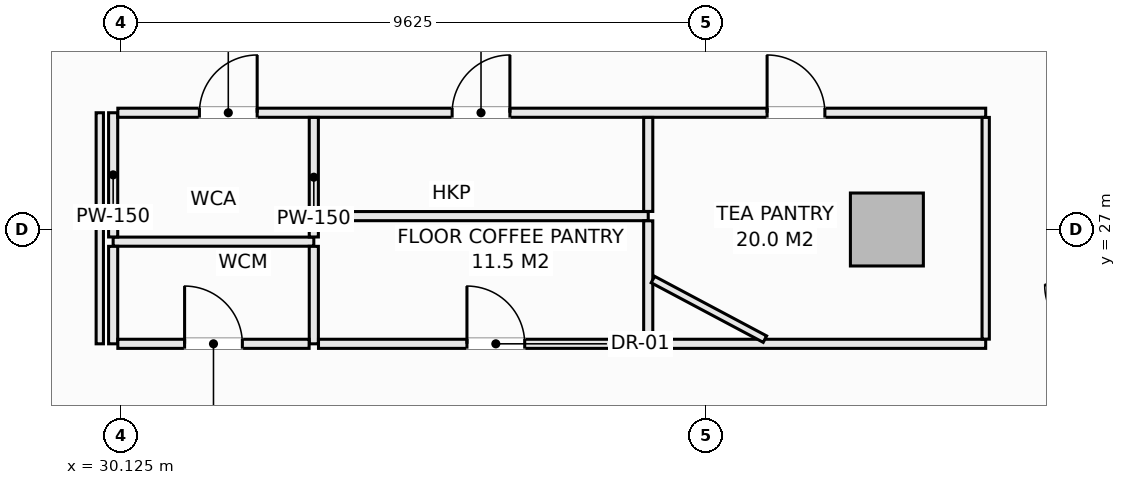
"""IFC4 building model, lengths in metres.
Left out: names, types, materials, properties, quantities, classifications, styles, units other than length and angle.
Written with IfcOpenShell. Run it as: python <this file> out.ifc"""

import sys

from ifc_helpers import new_model, si_unit, direction, frame, frame_2d, origin, origin_2d, place, context, subcontext, project, spatial, rectangle, extrude, element, fill, save


model = new_model("IFC4")
c1 = context("Model", 3, precision=1e-05, world=origin(), true_north=direction((0.0, 1.0)))
c2 = subcontext(c1, "Body", "Model", "MODEL_VIEW")
j1 = project(units=[si_unit("LENGTHUNIT", "METRE"), si_unit("PLANEANGLEUNIT", "RADIAN")], contexts=[c1])
p1 = place(None, origin())
s1 = spatial("IfcSite", under=j1, at=p1, CompositionType="ELEMENT")
p2 = place(p1, origin())
s2 = spatial("IfcBuilding", under=s1, at=p2, CompositionType="ELEMENT")
p3 = place(p2, frame((0.0, 0.0, 65.0)))
s3 = spatial("IfcBuildingStorey", under=s2, at=p3, CompositionType="ELEMENT", Elevation=65.0)
p4 = place(p3, frame((42.725, 27.0, -0.28), z_axis=(0.0, 0.0, 1.0), x_axis=(1.0, 0.0, 0.0)))
e1 = element("IfcColumn", 1, at=p4, inside=s3, PredefinedType="COLUMN", context=c2, shape_type="SweptSolid", body=[
    extrude(rectangle(XDim=1.2, YDim=1.2, at=origin_2d()), origin(), (0.0, 0.0, 1.0), 3.85),
])
p5 = place(p3, frame((30.0, 26.8, 0.0), z_axis=(0.0, 0.0, 1.0), x_axis=(1.0, 0.0, 0.0)))
e2 = element("IfcWall", 2, at=p5, inside=s3, PredefinedType="PARTITIONING", context=c2, shape_type="SweptSolid", body=[
    extrude(rectangle(XDim=3.3, YDim=0.15, at=frame_2d((1.65, 0.0))), origin(), (0.0, 0.0, 1.0), 3.57),
])
p6 = place(p3, frame((30.0, 25.12, 0.0), z_axis=(0.0, 0.0, 1.0), x_axis=(0.0, 1.0, 0.0)))
e3 = element("IfcWall", 3, at=p6, inside=s3, PredefinedType="PARTITIONING", context=c2, shape_type="SweptSolid", body=[
    extrude(rectangle(XDim=1.603, YDim=0.15, at=frame_2d((0.801, 0.0))), origin(), (0.0, 0.0, 1.0), 3.57),
])
p7 = place(p3, frame((30.0, 26.877, 0.0), z_axis=(0.0, 0.0, 1.0), x_axis=(0.0, 1.0, 0.0)))
e4 = element("IfcWall", 4, at=p7, inside=s3, PredefinedType="PARTITIONING", context=c2, shape_type="SweptSolid", body=[
    extrude(rectangle(XDim=2.043, YDim=0.15, at=frame_2d((1.021, 0.0))), origin(), (0.0, 0.0, 1.0), 3.57),
])
p8 = place(p3, frame((30.077, 28.92, 0.0), z_axis=(0.0, 0.0, 1.0), x_axis=(1.0, 0.0, 0.0)))
e5 = element("IfcWall", 5, at=p8, inside=s3, PredefinedType="PARTITIONING", context=c2, shape_type="SweptSolid", body=[
    extrude(rectangle(XDim=14.273, YDim=0.15, at=frame_2d((7.137, 0.0))), origin(), (0.0, 0.0, 1.0), 3.57),
])
p9 = place(p8, frame((1.342, 0.0, 0.0)))
e6 = element("IfcOpeningElement", 6, at=p9, cuts=e5, PredefinedType="OPENING", context=c2, shape_type="SweptSolid", body=[
    extrude(rectangle(XDim=0.95, YDim=2.1, at=frame_2d((0.475, 1.05))), frame((0.0, 0.085, 0.0), z_axis=(0.0, -1.0, 0.0), x_axis=(1.0, 0.0, 0.0)), (0.0, 0.0, 1.0), 0.17),
])
p10 = place(p8, frame((5.498, 0.0, 0.0)))
e7 = element("IfcOpeningElement", 7, at=p10, cuts=e5, PredefinedType="OPENING", context=c2, shape_type="SweptSolid", body=[
    extrude(rectangle(XDim=0.95, YDim=2.1, at=frame_2d((0.475, 1.05))), frame((0.0, 0.085, 0.0), z_axis=(0.0, -1.0, 0.0), x_axis=(1.0, 0.0, 0.0)), (0.0, 0.0, 1.0), 0.17),
])
p11 = place(p8, frame((10.678, 0.0, 0.0)))
e8 = element("IfcOpeningElement", 8, at=p11, cuts=e5, PredefinedType="OPENING", context=c2, shape_type="SweptSolid", body=[
    extrude(rectangle(XDim=0.95, YDim=2.1, at=frame_2d((0.475, 1.05))), frame((0.0, 0.085, 0.0), z_axis=(0.0, -1.0, 0.0), x_axis=(1.0, 0.0, 0.0)), (0.0, 0.0, 1.0), 0.17),
])
p12 = place(p3, frame((33.3, 25.12, 0.0), z_axis=(0.0, 0.0, 1.0), x_axis=(0.0, 1.0, 0.0)))
e9 = element("IfcWall", 9, at=p12, inside=s3, PredefinedType="PARTITIONING", context=c2, shape_type="SweptSolid", body=[
    extrude(rectangle(XDim=1.603, YDim=0.15, at=frame_2d((0.801, 0.0))), origin(), (0.0, 0.0, 1.0), 3.57),
])
p13 = place(p3, frame((33.3, 26.877, 0.0), z_axis=(0.0, 0.0, 1.0), x_axis=(0.0, 1.0, 0.0)))
e10 = element("IfcWall", 10, at=p13, inside=s3, PredefinedType="PARTITIONING", context=c2, shape_type="SweptSolid", body=[
    extrude(rectangle(XDim=1.966, YDim=0.15, at=frame_2d((0.983, 0.0))), origin(), (0.0, 0.0, 1.0), 3.57),
])
p14 = place(p3, frame((30.077, 25.12, 0.0), z_axis=(0.0, 0.0, 1.0), x_axis=(1.0, 0.0, 0.0)))
e11 = element("IfcWall", 11, at=p14, inside=s3, PredefinedType="PARTITIONING", context=c2, shape_type="SweptSolid", body=[
    extrude(rectangle(XDim=3.146, YDim=0.15, at=frame_2d((1.573, 0.0))), origin(), (0.0, 0.0, 1.0), 3.57),
])
p15 = place(p14, frame((1.098, 0.0, 0.0)))
e12 = element("IfcOpeningElement", 12, at=p15, cuts=e11, PredefinedType="OPENING", context=c2, shape_type="SweptSolid", body=[
    extrude(rectangle(XDim=0.95, YDim=2.1, at=frame_2d((0.475, 1.05))), frame((0.0, 0.085, 0.0), z_axis=(0.0, -1.0, 0.0), x_axis=(1.0, 0.0, 0.0)), (0.0, 0.0, 1.0), 0.17),
])
p16 = place(p3, frame((33.377, 25.12, 0.0), z_axis=(0.0, 0.0, 1.0), x_axis=(1.0, 0.0, 0.0)))
e13 = element("IfcWall", 13, at=p16, inside=s3, PredefinedType="PARTITIONING", context=c2, shape_type="SweptSolid", body=[
    extrude(rectangle(XDim=10.973, YDim=0.15, at=frame_2d((5.487, 0.0))), origin(), (0.0, 0.0, 1.0), 3.57),
])
p17 = place(p16, frame((2.441, 0.0, 0.0)))
e14 = element("IfcOpeningElement", 14, at=p17, cuts=e13, PredefinedType="OPENING", context=c2, shape_type="SweptSolid", body=[
    extrude(rectangle(XDim=0.95, YDim=2.1, at=frame_2d((0.475, 1.05))), frame((0.0, 0.085, 0.0), z_axis=(0.0, -1.0, 0.0), x_axis=(1.0, 0.0, 0.0)), (0.0, 0.0, 1.0), 0.17),
])
p18 = place(p3, frame((33.377, 27.22, 0.0), z_axis=(0.0, 0.0, 1.0), x_axis=(1.0, 0.0, 0.0)))
e15 = element("IfcWall", 15, at=p18, inside=s3, PredefinedType="PARTITIONING", context=c2, shape_type="SweptSolid", body=[
    extrude(rectangle(XDim=5.423, YDim=0.15, at=frame_2d((2.711, 0.0))), origin(), (0.0, 0.0, 1.0), 3.57),
])
p19 = place(p3, frame((38.8, 25.197, 0.0), z_axis=(0.0, 0.0, 1.0), x_axis=(0.0, 1.0, 0.0)))
e16 = element("IfcWall", 16, at=p19, inside=s3, PredefinedType="PARTITIONING", context=c2, shape_type="SweptSolid", body=[
    extrude(rectangle(XDim=1.946, YDim=0.15, at=frame_2d((0.973, 0.0))), origin(), (0.0, 0.0, 1.0), 3.57),
])
p20 = place(p3, frame((38.8, 27.297, 0.0), z_axis=(0.0, 0.0, 1.0), x_axis=(0.0, 1.0, 0.0)))
e17 = element("IfcWall", 17, at=p20, inside=s3, PredefinedType="PARTITIONING", context=c2, shape_type="SweptSolid", body=[
    extrude(rectangle(XDim=1.546, YDim=0.15, at=frame_2d((0.773, 0.0))), origin(), (0.0, 0.0, 1.0), 3.57),
])
p21 = place(p3, frame((29.78, 25.12, 0.0), z_axis=(0.0, 0.0, 1.0), x_axis=(0.0, 1.0, 0.0)))
e18 = element("IfcWall", 18, at=p21, inside=s3, PredefinedType="PARTITIONING", context=c2, shape_type="SweptSolid", body=[
    extrude(rectangle(XDim=3.8, YDim=0.12, at=frame_2d((1.9, 0.0))), origin(), (0.0, 0.0, 1.0), 3.57),
])
p22 = place(p3, frame((44.35, 25.197, 0.0), z_axis=(0.0, 0.0, 1.0), x_axis=(0.0, 1.0, 0.0)))
e19 = element("IfcWall", 19, at=p22, inside=s3, PredefinedType="PARTITIONING", context=c2, shape_type="SweptSolid", body=[
    extrude(rectangle(XDim=3.646, YDim=0.12, at=frame_2d((1.823, 0.0))), origin(), (0.0, 0.0, 1.0), 3.57),
])
p23 = place(p3, frame((38.877, 26.177, 0.0), z_axis=(0.0, 0.0, 1.0), x_axis=(0.882864132349, -0.469628495527, 0.0)))
e20 = element("IfcWall", 20, at=p23, inside=s3, PredefinedType="PARTITIONING", context=c2, shape_type="SweptSolid", body=[
    extrude(rectangle(XDim=2.087, YDim=0.12, at=frame_2d((1.043, 0.0))), origin(), (0.0, 0.0, 1.0), 3.57),
])
p24 = place(p9, origin())
e21 = element("IfcDoor", 21, at=p24, inside=s3, OperationType="SINGLE_SWING_RIGHT", PredefinedType="DOOR", context=c2, shape_type="SweptSolid", body=[
    extrude(rectangle(XDim=0.95, YDim=2.1, at=frame_2d((0.475, 1.05))), frame((0.0, 0.025, 0.0), z_axis=(0.0, -1.0, 0.0), x_axis=(1.0, 0.0, 0.0)), (0.0, 0.0, 1.0), 0.05),
])
fill(e6, e21)
p25 = place(p15, origin())
e22 = element("IfcDoor", 22, at=p25, inside=s3, OperationType="SINGLE_SWING_LEFT", PredefinedType="DOOR", context=c2, shape_type="SweptSolid", body=[
    extrude(rectangle(XDim=0.95, YDim=2.1, at=frame_2d((0.475, 1.05))), frame((0.0, 0.025, 0.0), z_axis=(0.0, -1.0, 0.0), x_axis=(1.0, 0.0, 0.0)), (0.0, 0.0, 1.0), 0.05),
])
fill(e12, e22)
p26 = place(p10, origin())
e23 = element("IfcDoor", 23, at=p26, inside=s3, OperationType="SINGLE_SWING_RIGHT", PredefinedType="DOOR", context=c2, shape_type="SweptSolid", body=[
    extrude(rectangle(XDim=0.95, YDim=2.1, at=frame_2d((0.475, 1.05))), frame((0.0, 0.025, 0.0), z_axis=(0.0, -1.0, 0.0), x_axis=(1.0, 0.0, 0.0)), (0.0, 0.0, 1.0), 0.05),
])
fill(e7, e23)
p27 = place(p17, origin())
e24 = element("IfcDoor", 24, at=p27, inside=s3, OperationType="SINGLE_SWING_LEFT", PredefinedType="DOOR", context=c2, shape_type="SweptSolid", body=[
    extrude(rectangle(XDim=0.95, YDim=2.1, at=frame_2d((0.475, 1.05))), frame((0.0, 0.025, 0.0), z_axis=(0.0, -1.0, 0.0), x_axis=(1.0, 0.0, 0.0)), (0.0, 0.0, 1.0), 0.05),
])
fill(e14, e24)
p28 = place(p11, origin())
e25 = element("IfcDoor", 25, at=p28, inside=s3, OperationType="SINGLE_SWING_LEFT", PredefinedType="DOOR", context=c2, shape_type="SweptSolid", body=[
    extrude(rectangle(XDim=0.95, YDim=2.1, at=frame_2d((0.475, 1.05))), frame((0.0, 0.025, 0.0), z_axis=(0.0, -1.0, 0.0), x_axis=(1.0, 0.0, 0.0)), (0.0, 0.0, 1.0), 0.05),
])
fill(e8, e25)
save(model, sys.argv[1])
